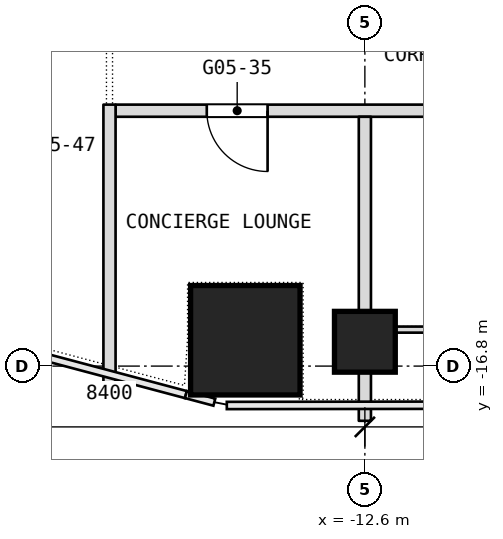
"""IFC4 building model, lengths in metres.
Left out: names, types, materials, properties, quantities, classifications, styles, units other than length and angle.
Written with IfcOpenShell. Run it as: python <this file> out.ifc"""

import sys

from ifc_helpers import new_model, si_unit, direction, frame, frame_2d, origin, origin_2d, place, context, subcontext, project, spatial, rectangle, extrude, element, fill, save


model = new_model("IFC4")
c1 = context("Model", 3, precision=1e-05, world=origin(), true_north=direction((0.0, 1.0)))
c2 = subcontext(c1, "Body", "Model", "MODEL_VIEW")
j1 = project(units=[si_unit("LENGTHUNIT", "METRE"), si_unit("PLANEANGLEUNIT", "RADIAN")], contexts=[c1])
p1 = place(None, origin())
s1 = spatial("IfcSite", under=j1, at=p1, CompositionType="ELEMENT")
p2 = place(p1, origin())
s2 = spatial("IfcBuilding", under=s1, at=p2, CompositionType="ELEMENT")
p3 = place(p2, frame((0.0, 0.0, 68.9)))
s3 = spatial("IfcBuildingStorey", under=s2, at=p3, CompositionType="ELEMENT", Elevation=68.9)
p4 = place(p3, frame((-14.566, -16.375, 0.0), z_axis=(0.0, 0.0, 1.0), x_axis=(1.0, 0.0, 0.0)))
e1 = element("IfcColumn", 1, at=p4, inside=s3, PredefinedType="COLUMN", context=c2, shape_type="SweptSolid", body=[
    extrude(rectangle(XDim=1.8, YDim=1.8, at=origin_2d()), origin(), (0.0, 0.0, 1.0), 3.6),
])
p5 = place(p3, frame((-12.6, -16.4, 0.0), z_axis=(0.0, 0.0, 1.0), x_axis=(1.0, 0.0, 0.0)))
e2 = element("IfcColumn", 2, at=p5, inside=s3, PredefinedType="COLUMN", context=c2, shape_type="SweptSolid", body=[
    extrude(rectangle(XDim=1.0, YDim=1.0, at=origin_2d()), origin(), (0.0, 0.0, 1.0), 3.6),
])
p6 = place(p3, frame((-12.5, -16.2, 0.0), z_axis=(0.0, 0.0, 1.0), x_axis=(1.0, 0.0, 0.0)))
e3 = element("IfcWall", 3, at=p6, inside=s3, PredefinedType="PARTITIONING", context=c2, shape_type="SweptSolid", body=[
    extrude(rectangle(XDim=3.55, YDim=0.1, at=frame_2d((1.775, 0.0))), origin(), (0.0, 0.0, 1.0), 2.94),
])
p7 = place(p3, frame((-16.7, -12.6, 0.0), z_axis=(0.0, 0.0, 1.0), x_axis=(1.0, 0.0, 0.0)))
e4 = element("IfcWall", 4, at=p7, inside=s3, PredefinedType="PARTITIONING", context=c2, shape_type="SweptSolid", body=[
    extrude(rectangle(XDim=33.4, YDim=0.2, at=frame_2d((16.7, 0.0))), origin(), (0.0, 0.0, 1.0), 3.34),
])
p8 = place(p7, frame((1.5, 0.0, 0.0)))
e5 = element("IfcOpeningElement", 5, at=p8, cuts=e4, PredefinedType="OPENING", context=c2, shape_type="SweptSolid", body=[
    extrude(rectangle(XDim=1.0, YDim=2.1, at=frame_2d((0.5, 1.05))), frame((0.0, 0.1, 0.0), z_axis=(0.0, -1.0, 0.0), x_axis=(1.0, 0.0, 0.0)), (0.0, 0.0, 1.0), 0.2),
])
p9 = place(p7, frame((7.8, 0.0, 0.0)))
e6 = element("IfcOpeningElement", 6, at=p9, cuts=e4, PredefinedType="OPENING", context=c2, shape_type="SweptSolid", body=[
    extrude(rectangle(XDim=1.1, YDim=2.1, at=frame_2d((0.55, 1.05))), frame((0.0, 0.1, 0.0), z_axis=(0.0, -1.0, 0.0), x_axis=(1.0, 0.0, 0.0)), (0.0, 0.0, 1.0), 0.2),
])
p10 = place(p7, frame((12.9, 0.0, 0.0)))
e7 = element("IfcOpeningElement", 7, at=p10, cuts=e4, PredefinedType="OPENING", context=c2, shape_type="SweptSolid", body=[
    extrude(rectangle(XDim=1.0, YDim=2.1, at=frame_2d((0.5, 1.05))), frame((0.0, 0.1, 0.0), z_axis=(0.0, -1.0, 0.0), x_axis=(1.0, 0.0, 0.0)), (0.0, 0.0, 1.0), 0.2),
])
p11 = place(p7, frame((19.5, 0.0, 0.0)))
e8 = element("IfcOpeningElement", 8, at=p11, cuts=e4, PredefinedType="OPENING", context=c2, shape_type="SweptSolid", body=[
    extrude(rectangle(XDim=1.0, YDim=2.1, at=frame_2d((0.5, 1.05))), frame((0.0, 0.1, 0.0), z_axis=(0.0, -1.0, 0.0), x_axis=(1.0, 0.0, 0.0)), (0.0, 0.0, 1.0), 0.2),
])
p12 = place(p7, frame((23.7, 0.0, 0.0)))
e9 = element("IfcOpeningElement", 9, at=p12, cuts=e4, PredefinedType="OPENING", context=c2, shape_type="SweptSolid", body=[
    extrude(rectangle(XDim=1.0, YDim=2.1, at=frame_2d((0.5, 1.05))), frame((0.0, 0.1, 0.0), z_axis=(0.0, -1.0, 0.0), x_axis=(1.0, 0.0, 0.0)), (0.0, 0.0, 1.0), 0.2),
])
p13 = place(p7, frame((25.5, 0.0, 0.0)))
e10 = element("IfcOpeningElement", 10, at=p13, cuts=e4, PredefinedType="OPENING", context=c2, shape_type="SweptSolid", body=[
    extrude(rectangle(XDim=1.0, YDim=2.1, at=frame_2d((0.5, 1.05))), frame((0.0, 0.1, 0.0), z_axis=(0.0, -1.0, 0.0), x_axis=(1.0, 0.0, 0.0)), (0.0, 0.0, 1.0), 0.2),
])
p14 = place(p7, frame((30.083, 0.0, 0.0)))
e11 = element("IfcOpeningElement", 11, at=p14, cuts=e4, PredefinedType="OPENING", context=c2, shape_type="SweptSolid", body=[
    extrude(rectangle(XDim=1.0, YDim=2.1, at=frame_2d((0.5, 1.05))), frame((0.0, 0.1, 0.0), z_axis=(0.0, -1.0, 0.0), x_axis=(1.0, 0.0, 0.0)), (0.0, 0.0, 1.0), 0.2),
])
p15 = place(p3, frame((-12.6, -17.7, 0.0), z_axis=(0.0, 0.0, 1.0), x_axis=(0.0, 1.0, 0.0)))
e12 = element("IfcWall", 12, at=p15, inside=s3, PredefinedType="PARTITIONING", context=c2, shape_type="SweptSolid", body=[
    extrude(rectangle(XDim=5.0, YDim=0.2, at=frame_2d((2.5, 0.0))), origin(), (0.0, 0.0, 1.0), 3.34),
])
p16 = place(p3, frame((-16.8, -17.143, 0.0), z_axis=(0.0, 0.0, 1.0), x_axis=(0.0, 1.0, 0.0)))
e13 = element("IfcWall", 13, at=p16, inside=s3, PredefinedType="PARTITIONING", context=c2, shape_type="SweptSolid", body=[
    extrude(rectangle(XDim=4.643, YDim=0.2, at=frame_2d((2.322, 0.0))), origin(), (0.0, 0.0, 1.0), 3.34),
])
p17 = place(p8, origin())
e14 = element("IfcDoor", 14, at=p17, inside=s3, OperationType="SINGLE_SWING_RIGHT", PredefinedType="DOOR", context=c2, shape_type="SweptSolid", body=[
    extrude(rectangle(XDim=1.0, YDim=2.1, at=frame_2d((0.5, 1.05))), frame((0.0, 0.025, 0.0), z_axis=(0.0, -1.0, 0.0), x_axis=(1.0, 0.0, 0.0)), (0.0, 0.0, 1.0), 0.05),
])
fill(e5, e14)
save(model, sys.argv[1])
